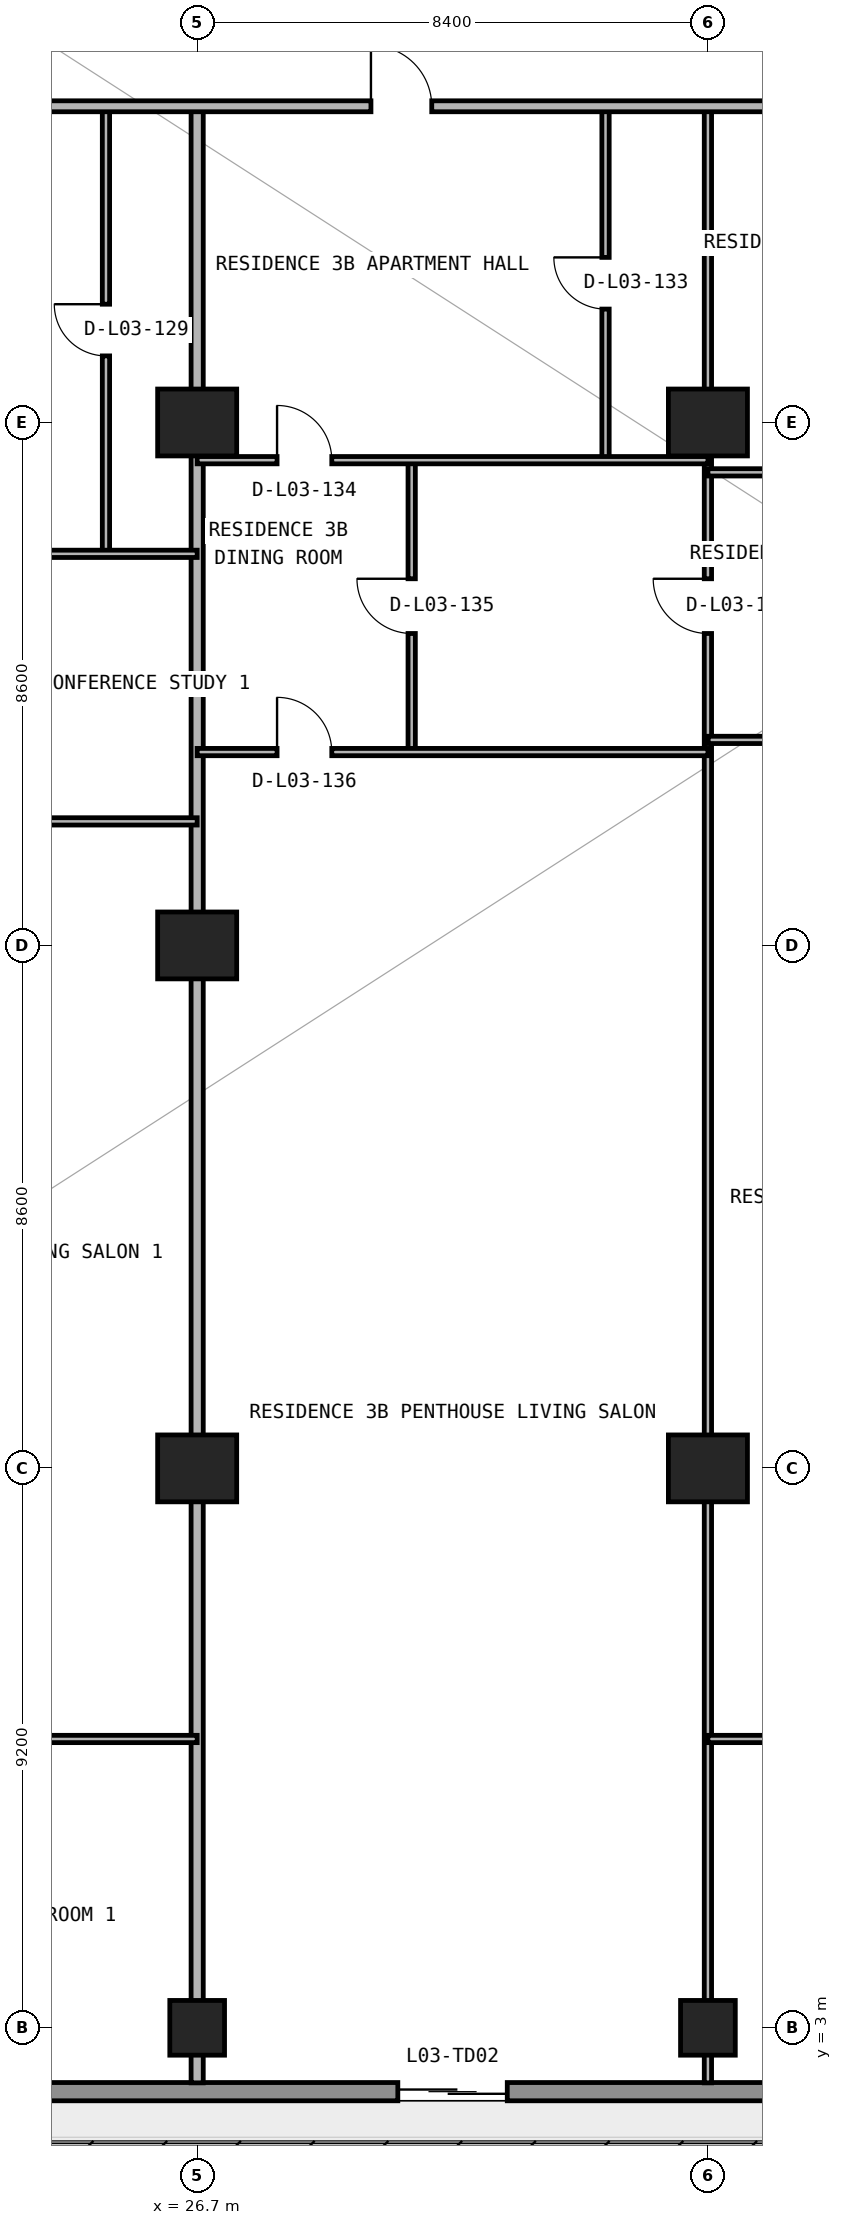
"""IFC4 building model, lengths in metres.
Left out: names, types, materials, properties, quantities, classifications, styles, units other than length and angle.
Written with IfcOpenShell. Run it as: python <this file> out.ifc"""

import sys

from ifc_helpers import new_model, si_unit, direction, frame, frame_2d, origin, origin_2d, place, context, subcontext, project, spatial, rectangle, circle, extrude, element, fill, save


model = new_model("IFC4")
c1 = context("Model", 3, precision=1e-05, world=origin(), true_north=direction((0.0, 1.0)))
c2 = subcontext(c1, "Body", "Model", "MODEL_VIEW")
j1 = project(units=[si_unit("LENGTHUNIT", "METRE"), si_unit("PLANEANGLEUNIT", "RADIAN")], contexts=[c1])
p1 = place(None, origin())
s1 = spatial("IfcSite", under=j1, at=p1, CompositionType="ELEMENT")
p2 = place(p1, origin())
s2 = spatial("IfcBuilding", under=s1, at=p2, CompositionType="ELEMENT")
p3 = place(p2, frame((0.0, 0.0, 15.0)))
s3 = spatial("IfcBuildingStorey", under=s2, at=p3, CompositionType="ELEMENT", Elevation=15.0)
for number, where, z_axis, x_axis in (
    (1, (26.7, 3.0, 0.0), (0.0, 0.0, 1.0), (1.0, 0.0, 0.0)),
    (2, (35.1, 3.0, 0.0), (0.0, 0.0, 1.0), (1.0, 0.0, 0.0)),
):
    element("IfcColumn", number, at=place(p3, frame(where, z_axis=z_axis, x_axis=x_axis)), inside=s3, PredefinedType="COLUMN", context=c2, shape_type="SweptSolid", body=[
        extrude(circle(Radius=0.45, at=origin_2d()), origin(), (0.0, 0.0, 1.0), 4.5),
    ])
for number, where, z_axis, x_axis in (
    (3, (26.7, 12.2, 0.0), (0.0, 0.0, 1.0), (1.0, 0.0, 0.0)),
    (4, (35.1, 12.2, 0.0), (0.0, 0.0, 1.0), (1.0, 0.0, 0.0)),
    (5, (26.7, 20.8, 0.0), (0.0, 0.0, 1.0), (1.0, 0.0, 0.0)),
    (6, (26.7, 29.4, 0.0), (0.0, 0.0, 1.0), (1.0, 0.0, 0.0)),
    (7, (35.1, 29.4, 0.0), (0.0, 0.0, 1.0), (1.0, 0.0, 0.0)),
):
    element("IfcColumn", number, at=place(p3, frame(where, z_axis=z_axis, x_axis=x_axis)), inside=s3, PredefinedType="COLUMN", context=c2, shape_type="SweptSolid", body=[
        extrude(rectangle(XDim=1.3, YDim=1.1, at=origin_2d()), origin(), (0.0, 0.0, 1.0), 4.5),
    ])
p4 = place(p3, frame((76.8, 1.95, 0.0), z_axis=(0.0, 0.0, 1.0), x_axis=(-1.0, 0.0, 0.0)))
e8 = element("IfcWall", 8, at=p4, inside=s3, PredefinedType="STANDARD", context=c2, shape_type="SweptSolid", body=[
    extrude(rectangle(XDim=75.8, YDim=0.3, at=frame_2d((37.9, 0.0))), origin(), (0.0, 0.0, 1.0), 4.5),
])
p5 = place(p4, frame((69.775, 0.0, 0.85)))
e9 = element("IfcOpeningElement", 9, at=p5, cuts=e8, PredefinedType="OPENING", context=c2, shape_type="SweptSolid", body=[
    extrude(rectangle(XDim=3.0, YDim=2.4, at=frame_2d((1.5, 1.2))), frame((0.0, 0.16, 0.0), z_axis=(0.0, -1.0, 0.0), x_axis=(1.0, 0.0, 0.0)), (0.0, 0.0, 1.0), 0.32),
])
p6 = place(p4, frame((61.8, 0.0, 0.0)))
e10 = element("IfcOpeningElement", 10, at=p6, cuts=e8, PredefinedType="OPENING", context=c2, shape_type="SweptSolid", body=[
    extrude(rectangle(XDim=1.8, YDim=2.3, at=frame_2d((0.9, 1.15))), frame((0.0, 0.16, 0.0), z_axis=(0.0, -1.0, 0.0), x_axis=(1.0, 0.0, 0.0)), (0.0, 0.0, 1.0), 0.32),
])
p7 = place(p4, frame((53.2, 0.0, 0.85)))
e11 = element("IfcOpeningElement", 11, at=p7, cuts=e8, PredefinedType="OPENING", context=c2, shape_type="SweptSolid", body=[
    extrude(rectangle(XDim=2.2, YDim=1.55, at=frame_2d((1.1, 0.775))), frame((0.0, 0.16, 0.0), z_axis=(0.0, -1.0, 0.0), x_axis=(1.0, 0.0, 0.0)), (0.0, 0.0, 1.0), 0.32),
])
p8 = place(p4, frame((45.0, 0.0, 0.0)))
e12 = element("IfcOpeningElement", 12, at=p8, cuts=e8, PredefinedType="OPENING", context=c2, shape_type="SweptSolid", body=[
    extrude(rectangle(XDim=1.8, YDim=2.3, at=frame_2d((0.9, 1.15))), frame((0.0, 0.16, 0.0), z_axis=(0.0, -1.0, 0.0), x_axis=(1.0, 0.0, 0.0)), (0.0, 0.0, 1.0), 0.32),
])
p9 = place(p4, frame((36.8, 0.0, 0.85)))
e13 = element("IfcOpeningElement", 13, at=p9, cuts=e8, PredefinedType="OPENING", context=c2, shape_type="SweptSolid", body=[
    extrude(rectangle(XDim=2.2, YDim=1.55, at=frame_2d((1.1, 0.775))), frame((0.0, 0.16, 0.0), z_axis=(0.0, -1.0, 0.0), x_axis=(1.0, 0.0, 0.0)), (0.0, 0.0, 1.0), 0.32),
])
p10 = place(p4, frame((28.8, 0.0, 0.85)))
e14 = element("IfcOpeningElement", 14, at=p10, cuts=e8, PredefinedType="OPENING", context=c2, shape_type="SweptSolid", body=[
    extrude(rectangle(XDim=2.2, YDim=1.55, at=frame_2d((1.1, 0.775))), frame((0.0, 0.16, 0.0), z_axis=(0.0, -1.0, 0.0), x_axis=(1.0, 0.0, 0.0)), (0.0, 0.0, 1.0), 0.32),
])
p11 = place(p4, frame((12.025, 0.0, 0.0)))
e15 = element("IfcOpeningElement", 15, at=p11, cuts=e8, PredefinedType="OPENING", context=c2, shape_type="SweptSolid", body=[
    extrude(rectangle(XDim=1.8, YDim=2.3, at=frame_2d((0.9, 1.15))), frame((0.0, 0.16, 0.0), z_axis=(0.0, -1.0, 0.0), x_axis=(1.0, 0.0, 0.0)), (0.0, 0.0, 1.0), 0.32),
])
p12 = place(p3, frame((25.2, 27.24, 0.0), z_axis=(0.0, 0.0, 1.0), x_axis=(0.0, 1.0, 0.0)))
e16 = element("IfcWall", 16, at=p12, inside=s3, PredefinedType="PARTITIONING", context=c2, shape_type="SweptSolid", body=[
    extrude(rectangle(XDim=7.36, YDim=0.12, at=frame_2d((3.68, 0.0))), origin(), (0.0, 0.0, 1.0), 4.5),
])
p13 = place(p12, frame((3.255, 0.0, 0.0)))
e17 = element("IfcOpeningElement", 17, at=p13, cuts=e16, PredefinedType="OPENING", context=c2, shape_type="SweptSolid", body=[
    extrude(rectangle(XDim=0.85, YDim=2.1, at=frame_2d((0.425, 1.05))), frame((0.0, 0.07, 0.0), z_axis=(0.0, -1.0, 0.0), x_axis=(1.0, 0.0, 0.0)), (0.0, 0.0, 1.0), 0.14),
])
p14 = place(p3, frame((26.7, 2.095, 0.0), z_axis=(0.0, 0.0, 1.0), x_axis=(0.0, 1.0, 0.0)))
e18 = element("IfcWall", 18, at=p14, inside=s3, PredefinedType="PARTITIONING", context=c2, shape_type="SweptSolid", body=[
    extrude(rectangle(XDim=32.505, YDim=0.2, at=frame_2d((16.252, 0.0))), origin(), (0.0, 0.0, 1.0), 3.464),
])
p15 = place(p3, frame((30.228, 23.98, 0.0), z_axis=(0.0, 0.0, 1.0), x_axis=(0.0, 1.0, 0.0)))
e19 = element("IfcWall", 19, at=p15, inside=s3, PredefinedType="PARTITIONING", context=c2, shape_type="SweptSolid", body=[
    extrude(rectangle(XDim=4.8, YDim=0.12, at=frame_2d((2.4, 0.0))), origin(), (0.0, 0.0, 1.0), 4.5),
])
p16 = place(p15, frame((1.95, 0.0, 0.0)))
e20 = element("IfcOpeningElement", 20, at=p16, cuts=e19, PredefinedType="OPENING", context=c2, shape_type="SweptSolid", body=[
    extrude(rectangle(XDim=0.9, YDim=2.15, at=frame_2d((0.45, 1.075))), frame((0.0, 0.07, 0.0), z_axis=(0.0, -1.0, 0.0), x_axis=(1.0, 0.0, 0.0)), (0.0, 0.0, 1.0), 0.14),
])
p17 = place(p3, frame((33.416, 28.78, 0.0), z_axis=(0.0, 0.0, 1.0), x_axis=(0.0, 1.0, 0.0)))
e21 = element("IfcWall", 21, at=p17, inside=s3, PredefinedType="PARTITIONING", context=c2, shape_type="SweptSolid", body=[
    extrude(rectangle(XDim=5.82, YDim=0.12, at=frame_2d((2.91, 0.0))), origin(), (0.0, 0.0, 1.0), 4.5),
])
p18 = place(p17, frame((2.485, 0.0, 0.0)))
e22 = element("IfcOpeningElement", 22, at=p18, cuts=e21, PredefinedType="OPENING", context=c2, shape_type="SweptSolid", body=[
    extrude(rectangle(XDim=0.85, YDim=2.1, at=frame_2d((0.425, 1.05))), frame((0.0, 0.07, 0.0), z_axis=(0.0, -1.0, 0.0), x_axis=(1.0, 0.0, 0.0)), (0.0, 0.0, 1.0), 0.14),
])
p19 = place(p3, frame((35.1, 2.095, 0.0), z_axis=(0.0, 0.0, 1.0), x_axis=(0.0, 1.0, 0.0)))
e23 = element("IfcWall", 23, at=p19, inside=s3, PredefinedType="PARTITIONING", context=c2, shape_type="SweptSolid", body=[
    extrude(rectangle(XDim=32.505, YDim=0.12, at=frame_2d((16.252, 0.0))), origin(), (0.0, 0.0, 1.0), 3.464),
])
p20 = place(p19, frame((23.835, 0.0, 0.0)))
e24 = element("IfcOpeningElement", 24, at=p20, cuts=e23, PredefinedType="OPENING", context=c2, shape_type="SweptSolid", body=[
    extrude(rectangle(XDim=0.9, YDim=2.15, at=frame_2d((0.45, 1.075))), frame((0.0, 0.07, 0.0), z_axis=(0.0, -1.0, 0.0), x_axis=(1.0, 0.0, 0.0)), (0.0, 0.0, 1.0), 0.14),
])
p21 = place(p3, frame((18.3, 7.75, 0.0), z_axis=(0.0, 0.0, 1.0), x_axis=(1.0, 0.0, 0.0)))
e25 = element("IfcWall", 25, at=p21, inside=s3, PredefinedType="PARTITIONING", context=c2, shape_type="SweptSolid", body=[
    extrude(rectangle(XDim=8.4, YDim=0.12, at=frame_2d((4.2, 0.0))), origin(), (0.0, 0.0, 1.0), 4.5),
])
p22 = place(p21, frame((3.75, 0.0, 0.0)))
e26 = element("IfcOpeningElement", 26, at=p22, cuts=e25, PredefinedType="OPENING", context=c2, shape_type="SweptSolid", body=[
    extrude(rectangle(XDim=0.9, YDim=2.15, at=frame_2d((0.45, 1.075))), frame((0.0, 0.07, 0.0), z_axis=(0.0, -1.0, 0.0), x_axis=(1.0, 0.0, 0.0)), (0.0, 0.0, 1.0), 0.14),
])
p23 = place(p3, frame((35.1, 7.75, 0.0), z_axis=(0.0, 0.0, 1.0), x_axis=(1.0, 0.0, 0.0)))
e27 = element("IfcWall", 27, at=p23, inside=s3, PredefinedType="PARTITIONING", context=c2, shape_type="SweptSolid", body=[
    extrude(rectangle(XDim=16.0, YDim=0.12, at=frame_2d((8.0, 0.0))), origin(), (0.0, 0.0, 1.0), 4.5),
])
p24 = place(p23, frame((3.35, 0.0, 0.0)))
e28 = element("IfcOpeningElement", 28, at=p24, cuts=e27, PredefinedType="OPENING", context=c2, shape_type="SweptSolid", body=[
    extrude(rectangle(XDim=0.9, YDim=2.15, at=frame_2d((0.45, 1.075))), frame((0.0, 0.07, 0.0), z_axis=(0.0, -1.0, 0.0), x_axis=(1.0, 0.0, 0.0)), (0.0, 0.0, 1.0), 0.14),
])
p25 = place(p23, frame((11.35, 0.0, 0.0)))
e29 = element("IfcOpeningElement", 29, at=p25, cuts=e27, PredefinedType="OPENING", context=c2, shape_type="SweptSolid", body=[
    extrude(rectangle(XDim=0.9, YDim=2.15, at=frame_2d((0.45, 1.075))), frame((0.0, 0.07, 0.0), z_axis=(0.0, -1.0, 0.0), x_axis=(1.0, 0.0, 0.0)), (0.0, 0.0, 1.0), 0.14),
])
p26 = place(p3, frame((18.305, 22.84, 0.0), z_axis=(0.0, 0.0, 1.0), x_axis=(1.0, 0.0, 0.0)))
e30 = element("IfcWall", 30, at=p26, inside=s3, PredefinedType="PARTITIONING", context=c2, shape_type="SweptSolid", body=[
    extrude(rectangle(XDim=8.395, YDim=0.12, at=frame_2d((4.198, 0.0))), origin(), (0.0, 0.0, 1.0), 4.5),
])
p27 = place(p26, frame((3.748, 0.0, 0.0)))
e31 = element("IfcOpeningElement", 31, at=p27, cuts=e30, PredefinedType="OPENING", context=c2, shape_type="SweptSolid", body=[
    extrude(rectangle(XDim=0.9, YDim=2.15, at=frame_2d((0.45, 1.075))), frame((0.0, 0.07, 0.0), z_axis=(0.0, -1.0, 0.0), x_axis=(1.0, 0.0, 0.0)), (0.0, 0.0, 1.0), 0.14),
])
p28 = place(p3, frame((26.7, 23.98, 0.0), z_axis=(0.0, 0.0, 1.0), x_axis=(1.0, 0.0, 0.0)))
e32 = element("IfcWall", 32, at=p28, inside=s3, PredefinedType="PARTITIONING", context=c2, shape_type="SweptSolid", body=[
    extrude(rectangle(XDim=8.4, YDim=0.12, at=frame_2d((4.2, 0.0))), origin(), (0.0, 0.0, 1.0), 4.5),
])
p29 = place(p28, frame((1.314, 0.0, 0.0)))
e33 = element("IfcOpeningElement", 33, at=p29, cuts=e32, PredefinedType="OPENING", context=c2, shape_type="SweptSolid", body=[
    extrude(rectangle(XDim=0.9, YDim=2.15, at=frame_2d((0.45, 1.075))), frame((0.0, 0.07, 0.0), z_axis=(0.0, -1.0, 0.0), x_axis=(1.0, 0.0, 0.0)), (0.0, 0.0, 1.0), 0.14),
])
p30 = place(p3, frame((35.105, 24.18, 0.0), z_axis=(0.0, 0.0, 1.0), x_axis=(1.0, 0.0, 0.0)))
e34 = element("IfcWall", 34, at=p30, inside=s3, PredefinedType="PARTITIONING", context=c2, shape_type="SweptSolid", body=[
    extrude(rectangle(XDim=7.59, YDim=0.12, at=frame_2d((3.795, 0.0))), origin(), (0.0, 0.0, 1.0), 4.5),
])
p31 = place(p30, frame((3.345, 0.0, 0.0)))
e35 = element("IfcOpeningElement", 35, at=p31, cuts=e34, PredefinedType="OPENING", context=c2, shape_type="SweptSolid", body=[
    extrude(rectangle(XDim=0.9, YDim=2.15, at=frame_2d((0.45, 1.075))), frame((0.0, 0.07, 0.0), z_axis=(0.0, -1.0, 0.0), x_axis=(1.0, 0.0, 0.0)), (0.0, 0.0, 1.0), 0.14),
])
p32 = place(p3, frame((18.3, 27.24, 0.0), z_axis=(0.0, 0.0, 1.0), x_axis=(1.0, 0.0, 0.0)))
e36 = element("IfcWall", 36, at=p32, inside=s3, PredefinedType="PARTITIONING", context=c2, shape_type="SweptSolid", body=[
    extrude(rectangle(XDim=8.4, YDim=0.12, at=frame_2d((4.2, 0.0))), origin(), (0.0, 0.0, 1.0), 4.5),
])
p33 = place(p32, frame((3.0, 0.0, 0.0)))
e37 = element("IfcOpeningElement", 37, at=p33, cuts=e36, PredefinedType="OPENING", context=c2, shape_type="SweptSolid", body=[
    extrude(rectangle(XDim=0.9, YDim=2.15, at=frame_2d((0.45, 1.075))), frame((0.0, 0.07, 0.0), z_axis=(0.0, -1.0, 0.0), x_axis=(1.0, 0.0, 0.0)), (0.0, 0.0, 1.0), 0.14),
])
p34 = place(p3, frame((35.1, 28.58, 0.0), z_axis=(0.0, 0.0, 1.0), x_axis=(1.0, 0.0, 0.0)))
e38 = element("IfcWall", 38, at=p34, inside=s3, PredefinedType="PARTITIONING", context=c2, shape_type="SweptSolid", body=[
    extrude(rectangle(XDim=7.6, YDim=0.12, at=frame_2d((3.8, 0.0))), origin(), (0.0, 0.0, 1.0), 4.5),
])
p35 = place(p34, frame((2.511, 0.0, 0.0)))
e39 = element("IfcOpeningElement", 39, at=p35, cuts=e38, PredefinedType="OPENING", context=c2, shape_type="SweptSolid", body=[
    extrude(rectangle(XDim=0.9, YDim=2.15, at=frame_2d((0.45, 1.075))), frame((0.0, 0.07, 0.0), z_axis=(0.0, -1.0, 0.0), x_axis=(1.0, 0.0, 0.0)), (0.0, 0.0, 1.0), 0.14),
])
p36 = place(p3, frame((26.7, 28.78, 0.0), z_axis=(0.0, 0.0, 1.0), x_axis=(1.0, 0.0, 0.0)))
e40 = element("IfcWall", 40, at=p36, inside=s3, PredefinedType="PARTITIONING", context=c2, shape_type="SweptSolid", body=[
    extrude(rectangle(XDim=8.4, YDim=0.12, at=frame_2d((4.2, 0.0))), origin(), (0.0, 0.0, 1.0), 4.5),
])
p37 = place(p36, frame((1.314, 0.0, 0.0)))
e41 = element("IfcOpeningElement", 41, at=p37, cuts=e40, PredefinedType="OPENING", context=c2, shape_type="SweptSolid", body=[
    extrude(rectangle(XDim=0.9, YDim=2.15, at=frame_2d((0.45, 1.075))), frame((0.0, 0.07, 0.0), z_axis=(0.0, -1.0, 0.0), x_axis=(1.0, 0.0, 0.0)), (0.0, 0.0, 1.0), 0.14),
])
p38 = place(p3, frame((1.295, 34.6, 0.0), z_axis=(0.0, 0.0, 1.0), x_axis=(1.0, 0.0, 0.0)))
e42 = element("IfcWall", 42, at=p38, inside=s3, PredefinedType="PARTITIONING", context=c2, shape_type="SweptSolid", body=[
    extrude(rectangle(XDim=75.21, YDim=0.18, at=frame_2d((37.605, 0.0))), origin(), (0.0, 0.0, 1.0), 4.5),
])
p39 = place(p38, frame((3.778, 0.0, 0.0)))
e43 = element("IfcOpeningElement", 43, at=p39, cuts=e42, PredefinedType="OPENING", context=c2, shape_type="SweptSolid", body=[
    extrude(rectangle(XDim=1.05, YDim=2.15, at=frame_2d((0.525, 1.075))), frame((0.0, 0.1, 0.0), z_axis=(0.0, -1.0, 0.0), x_axis=(1.0, 0.0, 0.0)), (0.0, 0.0, 1.0), 0.2),
])
p40 = place(p38, frame((11.555, 0.0, 0.0)))
e44 = element("IfcOpeningElement", 44, at=p40, cuts=e42, PredefinedType="OPENING", context=c2, shape_type="SweptSolid", body=[
    extrude(rectangle(XDim=1.0, YDim=2.2, at=frame_2d((0.5, 1.1))), frame((0.0, 0.1, 0.0), z_axis=(0.0, -1.0, 0.0), x_axis=(1.0, 0.0, 0.0)), (0.0, 0.0, 1.0), 0.2),
])
p41 = place(p38, frame((28.263, 0.0, 0.0)))
e45 = element("IfcOpeningElement", 45, at=p41, cuts=e42, PredefinedType="OPENING", context=c2, shape_type="SweptSolid", body=[
    extrude(rectangle(XDim=1.0, YDim=2.2, at=frame_2d((0.5, 1.1))), frame((0.0, 0.1, 0.0), z_axis=(0.0, -1.0, 0.0), x_axis=(1.0, 0.0, 0.0)), (0.0, 0.0, 1.0), 0.2),
])
p42 = place(p38, frame((61.982, 0.0, 0.0)))
e46 = element("IfcOpeningElement", 46, at=p42, cuts=e42, PredefinedType="OPENING", context=c2, shape_type="SweptSolid", body=[
    extrude(rectangle(XDim=1.05, YDim=2.15, at=frame_2d((0.525, 1.075))), frame((0.0, 0.1, 0.0), z_axis=(0.0, -1.0, 0.0), x_axis=(1.0, 0.0, 0.0)), (0.0, 0.0, 1.0), 0.2),
])
p43 = place(p8, origin())
e47 = element("IfcDoor", 47, at=p43, inside=s3, OperationType="DOUBLE_DOOR_SLIDING", PredefinedType="DOOR", context=c2, shape_type="SweptSolid", body=[
    extrude(rectangle(XDim=1.8, YDim=2.3, at=frame_2d((0.9, 1.15))), frame((0.0, 0.025, 0.0), z_axis=(0.0, -1.0, 0.0), x_axis=(1.0, 0.0, 0.0)), (0.0, 0.0, 1.0), 0.05),
])
fill(e12, e47)
p44 = place(p13, origin())
e48 = element("IfcDoor", 48, at=p44, inside=s3, OperationType="SINGLE_SWING_RIGHT", PredefinedType="DOOR", context=c2, shape_type="SweptSolid", body=[
    extrude(rectangle(XDim=0.85, YDim=2.1, at=frame_2d((0.425, 1.05))), frame((0.0, 0.025, 0.0), z_axis=(0.0, -1.0, 0.0), x_axis=(1.0, 0.0, 0.0)), (0.0, 0.0, 1.0), 0.05),
])
fill(e17, e48)
p45 = place(p41, origin())
e49 = element("IfcDoor", 49, at=p45, inside=s3, OperationType="SINGLE_SWING_LEFT", PredefinedType="DOOR", context=c2, shape_type="SweptSolid", body=[
    extrude(rectangle(XDim=1.0, YDim=2.2, at=frame_2d((0.5, 1.1))), frame((0.0, 0.025, 0.0), z_axis=(0.0, -1.0, 0.0), x_axis=(1.0, 0.0, 0.0)), (0.0, 0.0, 1.0), 0.05),
])
fill(e45, e49)
p46 = place(p18, origin())
e50 = element("IfcDoor", 50, at=p46, inside=s3, OperationType="SINGLE_SWING_RIGHT", PredefinedType="DOOR", context=c2, shape_type="SweptSolid", body=[
    extrude(rectangle(XDim=0.85, YDim=2.1, at=frame_2d((0.425, 1.05))), frame((0.0, 0.025, 0.0), z_axis=(0.0, -1.0, 0.0), x_axis=(1.0, 0.0, 0.0)), (0.0, 0.0, 1.0), 0.05),
])
fill(e22, e50)
p47 = place(p37, origin())
e51 = element("IfcDoor", 51, at=p47, inside=s3, OperationType="SINGLE_SWING_LEFT", PredefinedType="DOOR", context=c2, shape_type="SweptSolid", body=[
    extrude(rectangle(XDim=0.9, YDim=2.15, at=frame_2d((0.45, 1.075))), frame((0.0, 0.025, 0.0), z_axis=(0.0, -1.0, 0.0), x_axis=(1.0, 0.0, 0.0)), (0.0, 0.0, 1.0), 0.05),
])
fill(e41, e51)
p48 = place(p16, origin())
e52 = element("IfcDoor", 52, at=p48, inside=s3, OperationType="SINGLE_SWING_RIGHT", PredefinedType="DOOR", context=c2, shape_type="SweptSolid", body=[
    extrude(rectangle(XDim=0.9, YDim=2.15, at=frame_2d((0.45, 1.075))), frame((0.0, 0.025, 0.0), z_axis=(0.0, -1.0, 0.0), x_axis=(1.0, 0.0, 0.0)), (0.0, 0.0, 1.0), 0.05),
])
fill(e20, e52)
p49 = place(p29, origin())
e53 = element("IfcDoor", 53, at=p49, inside=s3, OperationType="SINGLE_SWING_LEFT", PredefinedType="DOOR", context=c2, shape_type="SweptSolid", body=[
    extrude(rectangle(XDim=0.9, YDim=2.15, at=frame_2d((0.45, 1.075))), frame((0.0, 0.025, 0.0), z_axis=(0.0, -1.0, 0.0), x_axis=(1.0, 0.0, 0.0)), (0.0, 0.0, 1.0), 0.05),
])
fill(e33, e53)
p50 = place(p20, origin())
e54 = element("IfcDoor", 54, at=p50, inside=s3, OperationType="SINGLE_SWING_RIGHT", PredefinedType="DOOR", context=c2, shape_type="SweptSolid", body=[
    extrude(rectangle(XDim=0.9, YDim=2.15, at=frame_2d((0.45, 1.075))), frame((0.0, 0.025, 0.0), z_axis=(0.0, -1.0, 0.0), x_axis=(1.0, 0.0, 0.0)), (0.0, 0.0, 1.0), 0.05),
])
fill(e24, e54)
save(model, sys.argv[1])
